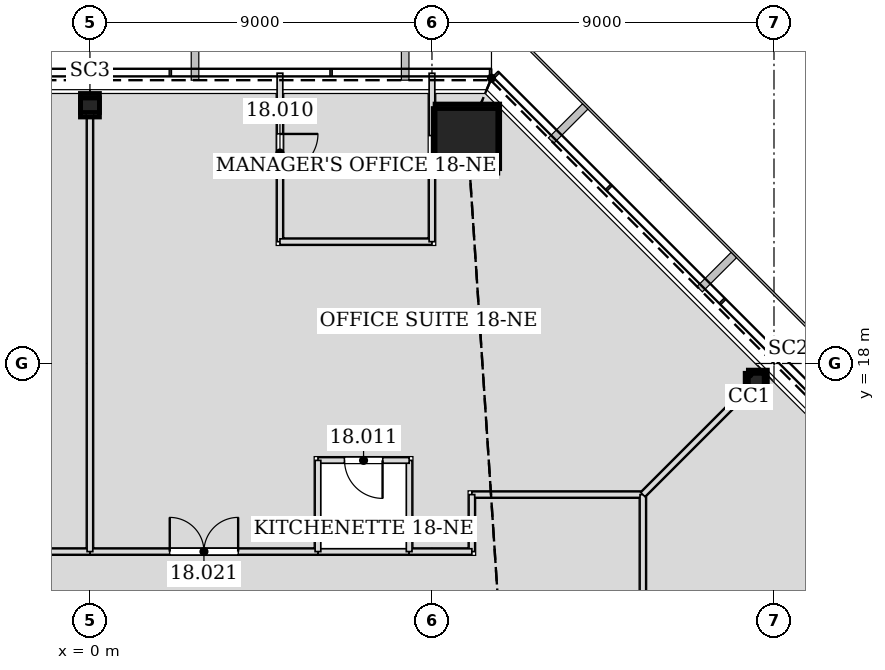
"""IFC4 building model, lengths in metres.
Left out: names, types, materials, properties, quantities, classifications, styles, units other than length and angle.
Written with IfcOpenShell. Run it as: python <this file> out.ifc"""

import sys

from ifc_helpers import new_model, si_unit, direction, frame, frame_2d, origin, origin_2d, place, context, subcontext, project, spatial, rectangle, hollow_rectangle, extrude, element, fill, save


model = new_model("IFC4")
c1 = context("Model", 3, precision=1e-05, world=origin(), true_north=direction((0.0, 1.0)))
c2 = subcontext(c1, "Body", "Model", "MODEL_VIEW")
j1 = project(units=[si_unit("LENGTHUNIT", "METRE"), si_unit("PLANEANGLEUNIT", "RADIAN")], contexts=[c1])
p1 = place(None, origin())
s1 = spatial("IfcSite", under=j1, at=p1, CompositionType="ELEMENT")
p2 = place(p1, origin())
s2 = spatial("IfcBuilding", under=s1, at=p2, CompositionType="ELEMENT")
p3 = place(p2, frame((0.0, 0.0, 83.4)))
s3 = spatial("IfcBuildingStorey", under=s2, at=p3, CompositionType="ELEMENT", Elevation=83.4)
p4 = place(p3, frame((9.932, 23.977, 0.0), z_axis=(-0.011677854952, -0.028294106277, 0.999531425846), x_axis=(0.924363308851, -0.38151339852, 0.0)))
e1 = element("IfcColumn", 1, at=p4, inside=s3, PredefinedType="COLUMN", context=c2, shape_type="SweptSolid", body=[
    extrude(hollow_rectangle(XDim=1.7, YDim=1.7, WallThickness=0.08, at=origin_2d()), origin(), (0.0, 0.0, 1.0), 4.202),
])
for number, where, z_axis, x_axis in (
    (2, (17.575, 17.575, 0.0), (-0.02, -0.02, 1.0), (0.707, -0.707, 0.0)),
    (3, (0.0, 24.855, 0.0), (0.0, -0.028, 1.0), (1.0, 0.0, 0.0)),
):
    element("IfcColumn", number, at=place(p3, frame(where, z_axis=z_axis, x_axis=x_axis)), inside=s3, PredefinedType="COLUMN", context=c2, shape_type="SweptSolid", body=[
        extrude(hollow_rectangle(XDim=0.5, YDim=0.5, WallThickness=0.025, at=origin_2d()), origin(), (0.0, 0.0, 1.0), 4.202),
    ])
p5 = place(p3, frame((8.401, 13.05, 0.0), z_axis=(0.0, 0.0, 1.0), x_axis=(-1.0, 0.0, 0.0)))
e4 = element("IfcWall", 4, at=p5, inside=s3, PredefinedType="PARTITIONING", context=c2, shape_type="SweptSolid", body=[
    extrude(rectangle(XDim=2.402, YDim=0.15, at=frame_2d((1.201, 0.0))), origin(), (0.0, 0.0, 1.0), 4.035),
])
p6 = place(p3, frame((6.001, 13.05, 0.0), z_axis=(0.0, 0.0, 1.0), x_axis=(-1.0, 0.0, 0.0)))
e5 = element("IfcWall", 5, at=p6, inside=s3, PredefinedType="PARTITIONING", context=c2, shape_type="SweptSolid", body=[
    extrude(rectangle(XDim=6.002, YDim=0.15, at=frame_2d((3.001, 0.0))), origin(), (0.0, 0.0, 1.0), 3.065),
])
p7 = place(p6, frame((2.101, 0.0, 0.0)))
e6 = element("IfcOpeningElement", 6, at=p7, cuts=e5, PredefinedType="OPENING", context=c2, shape_type="SweptSolid", body=[
    extrude(rectangle(XDim=1.8, YDim=2.4, at=frame_2d((0.9, 1.2))), frame((0.0, 0.085, 0.0), z_axis=(0.0, -1.0, 0.0), x_axis=(1.0, 0.0, 0.0)), (0.0, 0.0, 1.0), 0.17),
])
p8 = place(p3, frame((14.55, 14.55, 0.0), z_axis=(0.0, 0.0, 1.0), x_axis=(-1.0, 0.0, 0.0)))
e7 = element("IfcWall", 7, at=p8, inside=s3, PredefinedType="PARTITIONING", context=c2, shape_type="SweptSolid", body=[
    extrude(rectangle(XDim=4.5, YDim=0.15, at=frame_2d((2.25, 0.0))), origin(), (0.0, 0.0, 1.0), 3.014),
])
p9 = place(p3, frame((10.05, 14.55, 0.0), z_axis=(0.0, 0.0, 1.0), x_axis=(0.0, -1.0, 0.0)))
e8 = element("IfcWall", 8, at=p9, inside=s3, PredefinedType="PARTITIONING", context=c2, shape_type="SweptSolid", body=[
    extrude(rectangle(XDim=1.5, YDim=0.15, at=frame_2d((0.75, 0.0))), origin(), (0.0, 0.0, 1.0), 3.492),
])
p10 = place(p3, frame((10.05, 13.05, 0.0), z_axis=(0.0, 0.0, 1.0), x_axis=(-1.0, 0.0, 0.0)))
e9 = element("IfcWall", 9, at=p10, inside=s3, PredefinedType="PARTITIONING", context=c2, shape_type="SweptSolid", body=[
    extrude(rectangle(XDim=1.651, YDim=0.15, at=frame_2d((0.826, 0.0))), origin(), (0.0, 0.0, 1.0), 4.035),
])
p11 = place(p3, frame((0.001, 13.05, 0.0), z_axis=(0.0, 0.0, 1.0), x_axis=(-1.0, 0.0, 0.0)))
e10 = element("IfcWall", 10, at=p11, inside=s3, PredefinedType="PARTITIONING", context=c2, shape_type="SweptSolid", body=[
    extrude(rectangle(XDim=6.002, YDim=0.15, at=frame_2d((3.001, 0.0))), origin(), (0.0, 0.0, 1.0), 3.065),
])
p12 = place(p11, frame((2.101, 0.0, 0.0)))
e11 = element("IfcOpeningElement", 11, at=p12, cuts=e10, PredefinedType="OPENING", context=c2, shape_type="SweptSolid", body=[
    extrude(rectangle(XDim=1.8, YDim=2.4, at=frame_2d((0.9, 1.2))), frame((0.0, 0.085, 0.0), z_axis=(0.0, -1.0, 0.0), x_axis=(1.0, 0.0, 0.0)), (0.0, 0.0, 1.0), 0.17),
])
p13 = place(p3, frame((14.55, 10.05, 0.0), z_axis=(0.0, 0.0, 1.0), x_axis=(0.0, 1.0, 0.0)))
e12 = element("IfcWall", 12, at=p13, inside=s3, PredefinedType="PARTITIONING", context=c2, shape_type="SweptSolid", body=[
    extrude(rectangle(XDim=4.5, YDim=0.15, at=frame_2d((2.25, 0.0))), origin(), (0.0, 0.0, 1.0), 3.014),
])
p14 = place(p3, frame((5.0, 25.639, 0.0), z_axis=(0.0, 0.0, 1.0), x_axis=(0.0, -1.0, 0.0)))
e13 = element("IfcWall", 13, at=p14, inside=s3, PredefinedType="PARTITIONING", context=c2, shape_type="SweptSolid", body=[
    extrude(rectangle(XDim=4.434, YDim=0.15, at=frame_2d((2.217, 0.0))), origin(), (0.0, 0.0, 1.0), 3.423),
])
p15 = place(p14, frame((1.599, 0.0, 0.0)))
e14 = element("IfcOpeningElement", 14, at=p15, cuts=e13, PredefinedType="OPENING", context=c2, shape_type="SweptSolid", body=[
    extrude(rectangle(XDim=1.0, YDim=2.1, at=frame_2d((0.5, 1.05))), frame((0.0, 0.085, 0.0), z_axis=(0.0, -1.0, 0.0), x_axis=(1.0, 0.0, 0.0)), (0.0, 0.0, 1.0), 0.17),
])
p16 = place(p3, frame((5.0, 21.205, 0.0), z_axis=(0.0, 0.0, 1.0), x_axis=(1.0, 0.0, 0.0)))
e15 = element("IfcWall", 15, at=p16, inside=s3, PredefinedType="PARTITIONING", context=c2, shape_type="SweptSolid", body=[
    extrude(rectangle(XDim=4.0, YDim=0.15, at=frame_2d((2.0, 0.0))), origin(), (0.0, 0.0, 1.0), 4.035),
])
p17 = place(p3, frame((9.0, 21.205, 0.0), z_axis=(0.0, 0.0, 1.0), x_axis=(0.0, 1.0, 0.0)))
e16 = element("IfcWall", 16, at=p17, inside=s3, PredefinedType="PARTITIONING", context=c2, shape_type="SweptSolid", body=[
    extrude(rectangle(XDim=2.078, YDim=0.15, at=frame_2d((1.039, 0.0))), origin(), (0.0, 0.0, 1.0), 3.423),
])
p18 = place(p3, frame((9.0, 23.999, 0.0), z_axis=(0.0, 0.0, 1.0), x_axis=(0.0, 1.0, 0.0)))
e17 = element("IfcWall", 17, at=p18, inside=s3, PredefinedType="PARTITIONING", context=c2, shape_type="SweptSolid", body=[
    extrude(rectangle(XDim=1.639, YDim=0.15, at=frame_2d((0.819, 0.0))), origin(), (0.0, 0.0, 1.0), 3.497),
])
p19 = place(p3, frame((8.4, 13.05, 0.0), z_axis=(0.0, 0.0, 1.0), x_axis=(0.0, 1.0, 0.0)))
e18 = element("IfcWall", 18, at=p19, inside=s3, PredefinedType="PARTITIONING", context=c2, shape_type="SweptSolid", body=[
    extrude(rectangle(XDim=2.4, YDim=0.15, at=frame_2d((1.2, 0.0))), origin(), (0.0, 0.0, 1.0), 3.492),
])
p20 = place(p3, frame((8.4, 15.45, 0.0), z_axis=(0.0, 0.0, 1.0), x_axis=(-1.0, 0.0, 0.0)))
e19 = element("IfcWall", 19, at=p20, inside=s3, PredefinedType="PARTITIONING", context=c2, shape_type="SweptSolid", body=[
    extrude(rectangle(XDim=2.4, YDim=0.15, at=frame_2d((1.2, 0.0))), origin(), (0.0, 0.0, 1.0), 4.035),
])
p21 = place(p20, frame((0.7, 0.0, 0.0)))
e20 = element("IfcOpeningElement", 20, at=p21, cuts=e19, PredefinedType="OPENING", context=c2, shape_type="SweptSolid", body=[
    extrude(rectangle(XDim=1.0, YDim=2.1, at=frame_2d((0.5, 1.05))), frame((0.0, 0.085, 0.0), z_axis=(0.0, -1.0, 0.0), x_axis=(1.0, 0.0, 0.0)), (0.0, 0.0, 1.0), 0.17),
])
p22 = place(p3, frame((6.0, 15.45, 0.0), z_axis=(0.0, 0.0, 1.0), x_axis=(0.0, -1.0, 0.0)))
e21 = element("IfcWall", 21, at=p22, inside=s3, PredefinedType="PARTITIONING", context=c2, shape_type="SweptSolid", body=[
    extrude(rectangle(XDim=2.4, YDim=0.15, at=frame_2d((1.2, 0.0))), origin(), (0.0, 0.0, 1.0), 3.492),
])
p23 = place(p3, frame((0.0, 24.468, 0.0), z_axis=(0.0, 0.0, 1.0), x_axis=(0.0, -1.0, 0.0)))
e22 = element("IfcWall", 22, at=p23, inside=s3, PredefinedType="PARTITIONING", context=c2, shape_type="SweptSolid", body=[
    extrude(rectangle(XDim=11.417, YDim=0.15, at=frame_2d((5.709, 0.0))), origin(), (0.0, 0.0, 1.0), 3.065),
])
p24 = place(p3, frame((14.55, 14.55, 0.0), z_axis=(0.0, 0.0, 1.0), x_axis=(0.707106781187, 0.707106781187, 0.0)))
e23 = element("IfcWall", 23, at=p24, inside=s3, PredefinedType="PARTITIONING", context=c2, shape_type="SweptSolid", body=[
    extrude(rectangle(XDim=3.891, YDim=0.15, at=frame_2d((1.945, 0.0))), origin(), (0.0, 0.0, 1.0), 3.113),
])
p25 = place(p15, origin())
e24 = element("IfcDoor", 24, at=p25, inside=s3, OperationType="SINGLE_SWING_LEFT", PredefinedType="DOOR", context=c2, shape_type="SweptSolid", body=[
    extrude(rectangle(XDim=1.0, YDim=2.1, at=frame_2d((0.5, 1.05))), frame((0.0, 0.025, 0.0), z_axis=(0.0, -1.0, 0.0), x_axis=(1.0, 0.0, 0.0)), (0.0, 0.0, 1.0), 0.05),
])
fill(e14, e24)
p26 = place(p21, origin())
e25 = element("IfcDoor", 25, at=p26, inside=s3, OperationType="SINGLE_SWING_LEFT", PredefinedType="DOOR", context=c2, shape_type="SweptSolid", body=[
    extrude(rectangle(XDim=1.0, YDim=2.1, at=frame_2d((0.5, 1.05))), frame((0.0, 0.025, 0.0), z_axis=(0.0, -1.0, 0.0), x_axis=(1.0, 0.0, 0.0)), (0.0, 0.0, 1.0), 0.05),
])
fill(e20, e25)
p27 = place(p7, frame((1.8, 0.0, 0.0), z_axis=(0.0, 0.0, 1.0), x_axis=(-1.0, 0.0, 0.0)))
e26 = element("IfcDoor", 26, at=p27, inside=s3, OperationType="DOUBLE_DOOR_SINGLE_SWING", PredefinedType="DOOR", context=c2, shape_type="SweptSolid", body=[
    extrude(rectangle(XDim=1.8, YDim=2.4, at=frame_2d((0.9, 1.2))), frame((0.0, 0.025, 0.0), z_axis=(0.0, -1.0, 0.0), x_axis=(1.0, 0.0, 0.0)), (0.0, 0.0, 1.0), 0.05),
])
fill(e6, e26)
save(model, sys.argv[1])
